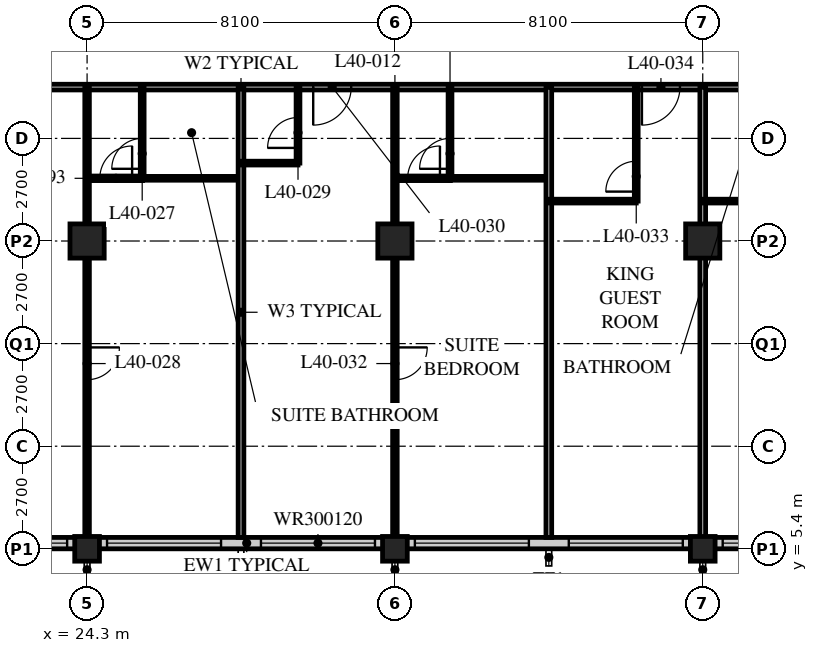
"""IFC4 building model, lengths in metres.
Left out: names, types, materials, properties, quantities, classifications, styles, units other than length and angle.
Written with IfcOpenShell. Run it as: python <this file> out.ifc"""

import sys

from ifc_helpers import new_model, si_unit, direction, frame, frame_2d, origin, origin_2d, place, context, subcontext, project, spatial, rectangle, hollow_rectangle, extrude, element, fill, save


model = new_model("IFC4")
c1 = context("Model", 3, precision=1e-05, world=origin(), true_north=direction((0.0, 1.0)))
c2 = subcontext(c1, "Body", "Model", "MODEL_VIEW")
j1 = project(units=[si_unit("LENGTHUNIT", "METRE"), si_unit("PLANEANGLEUNIT", "RADIAN")], contexts=[c1])
p1 = place(None, origin())
s1 = spatial("IfcSite", under=j1, at=p1, CompositionType="ELEMENT")
p2 = place(p1, origin())
s2 = spatial("IfcBuilding", under=s1, at=p2, CompositionType="ELEMENT")
p3 = place(p2, frame((0.0, 0.0, 154.4)))
s3 = spatial("IfcBuildingStorey", under=s2, at=p3, CompositionType="ELEMENT", Elevation=154.4)
p4 = place(p3, frame((24.3, 5.4, 0.0), z_axis=(0.0, 0.0, 1.0), x_axis=(1.0, 0.0, 0.0)))
e1 = element("IfcColumn", 1, at=p4, inside=s3, PredefinedType="COLUMN", context=c2, shape_type="SweptSolid", body=[
    extrude(hollow_rectangle(XDim=0.65, YDim=0.65, WallThickness=0.055, at=origin_2d()), origin(), (0.0, 0.0, 1.0), 3.4),
])
p5 = place(p3, frame((24.3, 13.5, 0.0), z_axis=(0.0, 0.0, 1.0), x_axis=(1.0, 0.0, 0.0)))
e2 = element("IfcColumn", 2, at=p5, inside=s3, PredefinedType="COLUMN", context=c2, shape_type="SweptSolid", body=[
    extrude(hollow_rectangle(XDim=0.9, YDim=0.9, WallThickness=0.1, at=origin_2d()), origin(), (0.0, 0.0, 1.0), 3.4),
])
p6 = place(p3, frame((32.4, 5.4, 0.0), z_axis=(0.0, 0.0, 1.0), x_axis=(1.0, 0.0, 0.0)))
e3 = element("IfcColumn", 3, at=p6, inside=s3, PredefinedType="COLUMN", context=c2, shape_type="SweptSolid", body=[
    extrude(hollow_rectangle(XDim=0.65, YDim=0.65, WallThickness=0.055, at=origin_2d()), origin(), (0.0, 0.0, 1.0), 3.4),
])
p7 = place(p3, frame((32.4, 13.5, 0.0), z_axis=(0.0, 0.0, 1.0), x_axis=(1.0, 0.0, 0.0)))
e4 = element("IfcColumn", 4, at=p7, inside=s3, PredefinedType="COLUMN", context=c2, shape_type="SweptSolid", body=[
    extrude(hollow_rectangle(XDim=0.9, YDim=0.9, WallThickness=0.1, at=origin_2d()), origin(), (0.0, 0.0, 1.0), 3.4),
])
p8 = place(p3, frame((40.5, 5.4, 0.0), z_axis=(0.0, 0.0, 1.0), x_axis=(1.0, 0.0, 0.0)))
e5 = element("IfcColumn", 5, at=p8, inside=s3, PredefinedType="COLUMN", context=c2, shape_type="SweptSolid", body=[
    extrude(hollow_rectangle(XDim=0.65, YDim=0.65, WallThickness=0.055, at=origin_2d()), origin(), (0.0, 0.0, 1.0), 3.4),
])
p9 = place(p3, frame((40.5, 13.5, 0.0), z_axis=(0.0, 0.0, 1.0), x_axis=(1.0, 0.0, 0.0)))
e6 = element("IfcColumn", 6, at=p9, inside=s3, PredefinedType="COLUMN", context=c2, shape_type="SweptSolid", body=[
    extrude(hollow_rectangle(XDim=0.9, YDim=0.9, WallThickness=0.1, at=origin_2d()), origin(), (0.0, 0.0, 1.0), 3.4),
])
p10 = place(p3, frame((8.4, 5.55, 0.0), z_axis=(0.0, 0.0, 1.0), x_axis=(1.0, 0.0, 0.0)))
e7 = element("IfcWall", 7, at=p10, inside=s3, PredefinedType="SOLIDWALL", context=c2, shape_type="SweptSolid", body=[
    extrude(rectangle(XDim=40.2, YDim=0.3, at=frame_2d((20.1, 0.0))), origin(), (0.0, 0.0, 1.0), 2.15),
])
p11 = place(p10, frame((0.225, 0.0, 0.9)))
e8 = element("IfcOpeningElement", 8, at=p11, cuts=e7, PredefinedType="OPENING", context=c2, shape_type="SweptSolid", body=[
    extrude(rectangle(XDim=3.0, YDim=1.2, at=frame_2d((1.5, 0.6))), frame((0.0, 0.16, 0.0), z_axis=(0.0, -1.0, 0.0), x_axis=(1.0, 0.0, 0.0)), (0.0, 0.0, 1.0), 0.32),
])
p12 = place(p10, frame((4.275, 0.0, 0.9)))
e9 = element("IfcOpeningElement", 9, at=p12, cuts=e7, PredefinedType="OPENING", context=c2, shape_type="SweptSolid", body=[
    extrude(rectangle(XDim=3.0, YDim=1.2, at=frame_2d((1.5, 0.6))), frame((0.0, 0.16, 0.0), z_axis=(0.0, -1.0, 0.0), x_axis=(1.0, 0.0, 0.0)), (0.0, 0.0, 1.0), 0.32),
])
p13 = place(p10, frame((8.325, 0.0, 0.9)))
e10 = element("IfcOpeningElement", 10, at=p13, cuts=e7, PredefinedType="OPENING", context=c2, shape_type="SweptSolid", body=[
    extrude(rectangle(XDim=3.0, YDim=1.2, at=frame_2d((1.5, 0.6))), frame((0.0, 0.16, 0.0), z_axis=(0.0, -1.0, 0.0), x_axis=(1.0, 0.0, 0.0)), (0.0, 0.0, 1.0), 0.32),
])
p14 = place(p10, frame((12.375, 0.0, 0.9)))
e11 = element("IfcOpeningElement", 11, at=p14, cuts=e7, PredefinedType="OPENING", context=c2, shape_type="SweptSolid", body=[
    extrude(rectangle(XDim=3.0, YDim=1.2, at=frame_2d((1.5, 0.6))), frame((0.0, 0.16, 0.0), z_axis=(0.0, -1.0, 0.0), x_axis=(1.0, 0.0, 0.0)), (0.0, 0.0, 1.0), 0.32),
])
p15 = place(p10, frame((16.425, 0.0, 0.9)))
e12 = element("IfcOpeningElement", 12, at=p15, cuts=e7, PredefinedType="OPENING", context=c2, shape_type="SweptSolid", body=[
    extrude(rectangle(XDim=3.0, YDim=1.2, at=frame_2d((1.5, 0.6))), frame((0.0, 0.16, 0.0), z_axis=(0.0, -1.0, 0.0), x_axis=(1.0, 0.0, 0.0)), (0.0, 0.0, 1.0), 0.32),
])
p16 = place(p10, frame((20.475, 0.0, 0.9)))
e13 = element("IfcOpeningElement", 13, at=p16, cuts=e7, PredefinedType="OPENING", context=c2, shape_type="SweptSolid", body=[
    extrude(rectangle(XDim=3.0, YDim=1.2, at=frame_2d((1.5, 0.6))), frame((0.0, 0.16, 0.0), z_axis=(0.0, -1.0, 0.0), x_axis=(1.0, 0.0, 0.0)), (0.0, 0.0, 1.0), 0.32),
])
p17 = place(p10, frame((24.525, 0.0, 0.9)))
e14 = element("IfcOpeningElement", 14, at=p17, cuts=e7, PredefinedType="OPENING", context=c2, shape_type="SweptSolid", body=[
    extrude(rectangle(XDim=3.0, YDim=1.2, at=frame_2d((1.5, 0.6))), frame((0.0, 0.16, 0.0), z_axis=(0.0, -1.0, 0.0), x_axis=(1.0, 0.0, 0.0)), (0.0, 0.0, 1.0), 0.32),
])
p18 = place(p10, frame((28.575, 0.0, 0.9)))
e15 = element("IfcOpeningElement", 15, at=p18, cuts=e7, PredefinedType="OPENING", context=c2, shape_type="SweptSolid", body=[
    extrude(rectangle(XDim=3.0, YDim=1.2, at=frame_2d((1.5, 0.6))), frame((0.0, 0.16, 0.0), z_axis=(0.0, -1.0, 0.0), x_axis=(1.0, 0.0, 0.0)), (0.0, 0.0, 1.0), 0.32),
])
p19 = place(p10, frame((32.625, 0.0, 0.9)))
e16 = element("IfcOpeningElement", 16, at=p19, cuts=e7, PredefinedType="OPENING", context=c2, shape_type="SweptSolid", body=[
    extrude(rectangle(XDim=3.0, YDim=1.2, at=frame_2d((1.5, 0.6))), frame((0.0, 0.16, 0.0), z_axis=(0.0, -1.0, 0.0), x_axis=(1.0, 0.0, 0.0)), (0.0, 0.0, 1.0), 0.32),
])
p20 = place(p10, frame((36.675, 0.0, 0.9)))
e17 = element("IfcOpeningElement", 17, at=p20, cuts=e7, PredefinedType="OPENING", context=c2, shape_type="SweptSolid", body=[
    extrude(rectangle(XDim=3.0, YDim=1.2, at=frame_2d((1.5, 0.6))), frame((0.0, 0.16, 0.0), z_axis=(0.0, -1.0, 0.0), x_axis=(1.0, 0.0, 0.0)), (0.0, 0.0, 1.0), 0.32),
])
p21 = place(p3, frame((8.1, 17.55, 0.0), z_axis=(0.0, 0.0, 1.0), x_axis=(1.0, 0.0, 0.0)))
e18 = element("IfcWall", 18, at=p21, inside=s3, PredefinedType="PARTITIONING", context=c2, shape_type="SweptSolid", body=[
    extrude(rectangle(XDim=40.5, YDim=0.15, at=frame_2d((20.25, 0.0))), origin(), (0.0, 0.0, 1.0), 3.15),
])
p22 = place(p21, frame((10.0, 0.0, 0.0)))
e19 = element("IfcOpeningElement", 19, at=p22, cuts=e18, PredefinedType="OPENING", context=c2, shape_type="SweptSolid", body=[
    extrude(rectangle(XDim=1.0, YDim=2.1, at=frame_2d((0.5, 1.05))), frame((0.0, 0.085, 0.0), z_axis=(0.0, -1.0, 0.0), x_axis=(1.0, 0.0, 0.0)), (0.0, 0.0, 1.0), 0.17),
])
p23 = place(p21, frame((22.15, 0.0, 0.0)))
e20 = element("IfcOpeningElement", 20, at=p23, cuts=e18, PredefinedType="OPENING", context=c2, shape_type="SweptSolid", body=[
    extrude(rectangle(XDim=1.0, YDim=2.1, at=frame_2d((0.5, 1.05))), frame((0.0, 0.085, 0.0), z_axis=(0.0, -1.0, 0.0), x_axis=(1.0, 0.0, 0.0)), (0.0, 0.0, 1.0), 0.17),
])
p24 = place(p21, frame((30.8, 0.0, 0.0)))
e21 = element("IfcOpeningElement", 21, at=p24, cuts=e18, PredefinedType="OPENING", context=c2, shape_type="SweptSolid", body=[
    extrude(rectangle(XDim=1.0, YDim=2.1, at=frame_2d((0.5, 1.05))), frame((0.0, 0.085, 0.0), z_axis=(0.0, -1.0, 0.0), x_axis=(1.0, 0.0, 0.0)), (0.0, 0.0, 1.0), 0.17),
])
p25 = place(p21, frame((34.85, 0.0, 0.0)))
e22 = element("IfcOpeningElement", 22, at=p25, cuts=e18, PredefinedType="OPENING", context=c2, shape_type="SweptSolid", body=[
    extrude(rectangle(XDim=1.0, YDim=2.1, at=frame_2d((0.5, 1.05))), frame((0.0, 0.085, 0.0), z_axis=(0.0, -1.0, 0.0), x_axis=(1.0, 0.0, 0.0)), (0.0, 0.0, 1.0), 0.17),
])
p26 = place(p21, frame((1.525, 0.0, 0.0)))
e23 = element("IfcOpeningElement", 23, at=p26, cuts=e18, PredefinedType="OPENING", context=c2, shape_type="SweptSolid", body=[
    extrude(rectangle(XDim=1.0, YDim=2.1, at=frame_2d((0.5, 1.05))), frame((0.0, 0.085, 0.0), z_axis=(0.0, -1.0, 0.0), x_axis=(1.0, 0.0, 0.0)), (0.0, 0.0, 1.0), 0.17),
])
p27 = place(p21, frame((37.975, 0.0, 0.0)))
e24 = element("IfcOpeningElement", 24, at=p27, cuts=e18, PredefinedType="OPENING", context=c2, shape_type="SweptSolid", body=[
    extrude(rectangle(XDim=1.0, YDim=2.1, at=frame_2d((0.5, 1.05))), frame((0.0, 0.085, 0.0), z_axis=(0.0, -1.0, 0.0), x_axis=(1.0, 0.0, 0.0)), (0.0, 0.0, 1.0), 0.17),
])
p28 = place(p3, frame((25.75, 15.15, 0.0), z_axis=(0.0, 0.0, 1.0), x_axis=(1.0, 0.0, 0.0)))
e25 = element("IfcWall", 25, at=p28, inside=s3, PredefinedType="PARTITIONING", context=c2, shape_type="SweptSolid", body=[
    extrude(rectangle(XDim=2.6, YDim=0.1, at=frame_2d((1.3, 0.0))), origin(), (0.0, 0.0, 1.0), 3.15),
])
p29 = place(p3, frame((25.75, 17.55, 0.0), z_axis=(0.0, 0.0, 1.0), x_axis=(0.0, -1.0, 0.0)))
e26 = element("IfcWall", 26, at=p29, inside=s3, PredefinedType="PARTITIONING", context=c2, shape_type="SweptSolid", body=[
    extrude(rectangle(XDim=2.4, YDim=0.1, at=frame_2d((1.2, 0.0))), origin(), (0.0, 0.0, 1.0), 3.15),
])
p30 = place(p29, frame((1.35, 0.0, 0.0)))
e27 = element("IfcOpeningElement", 27, at=p30, cuts=e26, PredefinedType="OPENING", context=c2, shape_type="SweptSolid", body=[
    extrude(rectangle(XDim=0.8, YDim=2.1, at=frame_2d((0.4, 1.05))), frame((0.0, 0.06, 0.0), z_axis=(0.0, -1.0, 0.0), x_axis=(1.0, 0.0, 0.0)), (0.0, 0.0, 1.0), 0.12),
])
p31 = place(p3, frame((24.3, 17.55, 0.0), z_axis=(0.0, 0.0, 1.0), x_axis=(0.0, -1.0, 0.0)))
e28 = element("IfcWall", 28, at=p31, inside=s3, PredefinedType="PARTITIONING", context=c2, shape_type="SweptSolid", body=[
    extrude(rectangle(XDim=11.85, YDim=0.12, at=frame_2d((5.925, 0.0))), origin(), (0.0, 0.0, 1.0), 2.15),
])
p32 = place(p31, frame((6.85, 0.0, 0.0)))
e29 = element("IfcOpeningElement", 29, at=p32, cuts=e28, PredefinedType="OPENING", context=c2, shape_type="SweptSolid", body=[
    extrude(rectangle(XDim=0.85, YDim=2.1, at=frame_2d((0.425, 1.05))), frame((0.0, 0.07, 0.0), z_axis=(0.0, -1.0, 0.0), x_axis=(1.0, 0.0, 0.0)), (0.0, 0.0, 1.0), 0.14),
])
p33 = place(p3, frame((28.35, 17.55, 0.0), z_axis=(0.0, 0.0, 1.0), x_axis=(0.0, -1.0, 0.0)))
e30 = element("IfcWall", 30, at=p33, inside=s3, PredefinedType="PARTITIONING", context=c2, shape_type="SweptSolid", body=[
    extrude(rectangle(XDim=11.85, YDim=0.15, at=frame_2d((5.925, 0.0))), origin(), (0.0, 0.0, 1.0), 3.15),
])
p34 = place(p3, frame((28.35, 15.55, 0.0), z_axis=(0.0, 0.0, 1.0), x_axis=(1.0, 0.0, 0.0)))
e31 = element("IfcWall", 31, at=p34, inside=s3, PredefinedType="PARTITIONING", context=c2, shape_type="SweptSolid", body=[
    extrude(rectangle(XDim=1.5, YDim=0.1, at=frame_2d((0.75, 0.0))), origin(), (0.0, 0.0, 1.0), 3.15),
])
p35 = place(p3, frame((29.85, 17.55, 0.0), z_axis=(0.0, 0.0, 1.0), x_axis=(0.0, -1.0, 0.0)))
e32 = element("IfcWall", 32, at=p35, inside=s3, PredefinedType="PARTITIONING", context=c2, shape_type="SweptSolid", body=[
    extrude(rectangle(XDim=2.0, YDim=0.1, at=frame_2d((1.0, 0.0))), origin(), (0.0, 0.0, 1.0), 3.15),
])
p36 = place(p35, frame((0.8, 0.0, 0.0)))
e33 = element("IfcOpeningElement", 33, at=p36, cuts=e32, PredefinedType="OPENING", context=c2, shape_type="SweptSolid", body=[
    extrude(rectangle(XDim=0.8, YDim=2.1, at=frame_2d((0.4, 1.05))), frame((0.0, 0.06, 0.0), z_axis=(0.0, -1.0, 0.0), x_axis=(1.0, 0.0, 0.0)), (0.0, 0.0, 1.0), 0.12),
])
p37 = place(p3, frame((33.85, 15.15, 0.0), z_axis=(0.0, 0.0, 1.0), x_axis=(1.0, 0.0, 0.0)))
e34 = element("IfcWall", 34, at=p37, inside=s3, PredefinedType="PARTITIONING", context=c2, shape_type="SweptSolid", body=[
    extrude(rectangle(XDim=2.6, YDim=0.1, at=frame_2d((1.3, 0.0))), origin(), (0.0, 0.0, 1.0), 3.15),
])
p38 = place(p3, frame((33.85, 17.55, 0.0), z_axis=(0.0, 0.0, 1.0), x_axis=(0.0, -1.0, 0.0)))
e35 = element("IfcWall", 35, at=p38, inside=s3, PredefinedType="PARTITIONING", context=c2, shape_type="SweptSolid", body=[
    extrude(rectangle(XDim=2.4, YDim=0.1, at=frame_2d((1.2, 0.0))), origin(), (0.0, 0.0, 1.0), 3.15),
])
p39 = place(p38, frame((1.35, 0.0, 0.0)))
e36 = element("IfcOpeningElement", 36, at=p39, cuts=e35, PredefinedType="OPENING", context=c2, shape_type="SweptSolid", body=[
    extrude(rectangle(XDim=0.8, YDim=2.1, at=frame_2d((0.4, 1.05))), frame((0.0, 0.06, 0.0), z_axis=(0.0, -1.0, 0.0), x_axis=(1.0, 0.0, 0.0)), (0.0, 0.0, 1.0), 0.12),
])
p40 = place(p3, frame((32.4, 17.55, 0.0), z_axis=(0.0, 0.0, 1.0), x_axis=(0.0, -1.0, 0.0)))
e37 = element("IfcWall", 37, at=p40, inside=s3, PredefinedType="PARTITIONING", context=c2, shape_type="SweptSolid", body=[
    extrude(rectangle(XDim=11.85, YDim=0.12, at=frame_2d((5.925, 0.0))), origin(), (0.0, 0.0, 1.0), 2.15),
])
p41 = place(p40, frame((6.85, 0.0, 0.0)))
e38 = element("IfcOpeningElement", 38, at=p41, cuts=e37, PredefinedType="OPENING", context=c2, shape_type="SweptSolid", body=[
    extrude(rectangle(XDim=0.85, YDim=2.1, at=frame_2d((0.425, 1.05))), frame((0.0, 0.07, 0.0), z_axis=(0.0, -1.0, 0.0), x_axis=(1.0, 0.0, 0.0)), (0.0, 0.0, 1.0), 0.14),
])
p42 = place(p3, frame((36.45, 17.55, 0.0), z_axis=(0.0, 0.0, 1.0), x_axis=(0.0, -1.0, 0.0)))
e39 = element("IfcWall", 39, at=p42, inside=s3, PredefinedType="PARTITIONING", context=c2, shape_type="SweptSolid", body=[
    extrude(rectangle(XDim=11.85, YDim=0.15, at=frame_2d((5.925, 0.0))), origin(), (0.0, 0.0, 1.0), 3.15),
])
p43 = place(p3, frame((36.45, 14.55, 0.0), z_axis=(0.0, 0.0, 1.0), x_axis=(1.0, 0.0, 0.0)))
e40 = element("IfcWall", 40, at=p43, inside=s3, PredefinedType="PARTITIONING", context=c2, shape_type="SweptSolid", body=[
    extrude(rectangle(XDim=2.3, YDim=0.1, at=frame_2d((1.15, 0.0))), origin(), (0.0, 0.0, 1.0), 3.15),
])
p44 = place(p3, frame((38.75, 17.55, 0.0), z_axis=(0.0, 0.0, 1.0), x_axis=(0.0, -1.0, 0.0)))
e41 = element("IfcWall", 41, at=p44, inside=s3, PredefinedType="PARTITIONING", context=c2, shape_type="SweptSolid", body=[
    extrude(rectangle(XDim=3.0, YDim=0.1, at=frame_2d((1.5, 0.0))), origin(), (0.0, 0.0, 1.0), 3.15),
])
p45 = place(p44, frame((1.95, 0.0, 0.0)))
e42 = element("IfcOpeningElement", 42, at=p45, cuts=e41, PredefinedType="OPENING", context=c2, shape_type="SweptSolid", body=[
    extrude(rectangle(XDim=0.8, YDim=2.1, at=frame_2d((0.4, 1.05))), frame((0.0, 0.06, 0.0), z_axis=(0.0, -1.0, 0.0), x_axis=(1.0, 0.0, 0.0)), (0.0, 0.0, 1.0), 0.12),
])
p46 = place(p3, frame((40.5, 17.55, 0.0), z_axis=(0.0, 0.0, 1.0), x_axis=(0.0, -1.0, 0.0)))
e43 = element("IfcWall", 43, at=p46, inside=s3, PredefinedType="PARTITIONING", context=c2, shape_type="SweptSolid", body=[
    extrude(rectangle(XDim=11.85, YDim=0.15, at=frame_2d((5.925, 0.0))), origin(), (0.0, 0.0, 1.0), 2.15),
])
p47 = place(p3, frame((40.5, 14.55, 0.0), z_axis=(0.0, 0.0, 1.0), x_axis=(1.0, 0.0, 0.0)))
e44 = element("IfcWall", 44, at=p47, inside=s3, PredefinedType="PARTITIONING", context=c2, shape_type="SweptSolid", body=[
    extrude(rectangle(XDim=2.3, YDim=0.1, at=frame_2d((1.15, 0.0))), origin(), (0.0, 0.0, 1.0), 3.15),
])
p48 = place(p3, frame((25.76, 15.15, 0.0), z_axis=(0.0, 0.0, 1.0), x_axis=(-1.0, 0.0, 0.0)))
e45 = element("IfcWall", 45, at=p48, inside=s3, PredefinedType="PARTITIONING", context=c2, shape_type="SweptSolid", body=[
    extrude(rectangle(XDim=1.46, YDim=0.12, at=frame_2d((0.73, 0.0))), origin(), (0.0, 0.0, 1.0), 3.15),
])
p49 = place(p48, frame((0.275, 0.0, 0.0)))
e46 = element("IfcOpeningElement", 46, at=p49, cuts=e45, PredefinedType="OPENING", context=c2, shape_type="SweptSolid", body=[
    extrude(rectangle(XDim=0.85, YDim=2.1, at=frame_2d((0.425, 1.05))), frame((0.0, 0.07, 0.0), z_axis=(0.0, -1.0, 0.0), x_axis=(1.0, 0.0, 0.0)), (0.0, 0.0, 1.0), 0.14),
])
p50 = place(p3, frame((33.86, 15.15, 0.0), z_axis=(0.0, 0.0, 1.0), x_axis=(-1.0, 0.0, 0.0)))
e47 = element("IfcWall", 47, at=p50, inside=s3, PredefinedType="PARTITIONING", context=c2, shape_type="SweptSolid", body=[
    extrude(rectangle(XDim=1.46, YDim=0.12, at=frame_2d((0.73, 0.0))), origin(), (0.0, 0.0, 1.0), 3.15),
])
p51 = place(p50, frame((0.275, 0.0, 0.0)))
e48 = element("IfcOpeningElement", 48, at=p51, cuts=e47, PredefinedType="OPENING", context=c2, shape_type="SweptSolid", body=[
    extrude(rectangle(XDim=0.85, YDim=2.1, at=frame_2d((0.425, 1.05))), frame((0.0, 0.07, 0.0), z_axis=(0.0, -1.0, 0.0), x_axis=(1.0, 0.0, 0.0)), (0.0, 0.0, 1.0), 0.14),
])
p52 = place(p14, origin())
e49 = element("IfcWindow", 49, at=p52, inside=s3, PartitioningType="SINGLE_PANEL", PredefinedType="WINDOW", context=c2, shape_type="SweptSolid", body=[
    extrude(rectangle(XDim=3.0, YDim=1.2, at=frame_2d((1.5, 0.6))), frame((0.0, 0.03, 0.0), z_axis=(0.0, -1.0, 0.0), x_axis=(1.0, 0.0, 0.0)), (0.0, 0.0, 1.0), 0.06),
])
fill(e11, e49)
p53 = place(p15, origin())
e50 = element("IfcWindow", 50, at=p53, inside=s3, PartitioningType="SINGLE_PANEL", PredefinedType="WINDOW", context=c2, shape_type="SweptSolid", body=[
    extrude(rectangle(XDim=3.0, YDim=1.2, at=frame_2d((1.5, 0.6))), frame((0.0, 0.03, 0.0), z_axis=(0.0, -1.0, 0.0), x_axis=(1.0, 0.0, 0.0)), (0.0, 0.0, 1.0), 0.06),
])
fill(e12, e50)
p54 = place(p16, origin())
e51 = element("IfcWindow", 51, at=p54, inside=s3, PartitioningType="SINGLE_PANEL", PredefinedType="WINDOW", context=c2, shape_type="SweptSolid", body=[
    extrude(rectangle(XDim=3.0, YDim=1.2, at=frame_2d((1.5, 0.6))), frame((0.0, 0.03, 0.0), z_axis=(0.0, -1.0, 0.0), x_axis=(1.0, 0.0, 0.0)), (0.0, 0.0, 1.0), 0.06),
])
fill(e13, e51)
p55 = place(p17, origin())
e52 = element("IfcWindow", 52, at=p55, inside=s3, PartitioningType="SINGLE_PANEL", PredefinedType="WINDOW", context=c2, shape_type="SweptSolid", body=[
    extrude(rectangle(XDim=3.0, YDim=1.2, at=frame_2d((1.5, 0.6))), frame((0.0, 0.03, 0.0), z_axis=(0.0, -1.0, 0.0), x_axis=(1.0, 0.0, 0.0)), (0.0, 0.0, 1.0), 0.06),
])
fill(e14, e52)
p56 = place(p18, origin())
e53 = element("IfcWindow", 53, at=p56, inside=s3, PartitioningType="SINGLE_PANEL", PredefinedType="WINDOW", context=c2, shape_type="SweptSolid", body=[
    extrude(rectangle(XDim=3.0, YDim=1.2, at=frame_2d((1.5, 0.6))), frame((0.0, 0.03, 0.0), z_axis=(0.0, -1.0, 0.0), x_axis=(1.0, 0.0, 0.0)), (0.0, 0.0, 1.0), 0.06),
])
fill(e15, e53)
p57 = place(p19, origin())
e54 = element("IfcWindow", 54, at=p57, inside=s3, PartitioningType="SINGLE_PANEL", PredefinedType="WINDOW", context=c2, shape_type="SweptSolid", body=[
    extrude(rectangle(XDim=3.0, YDim=1.2, at=frame_2d((1.5, 0.6))), frame((0.0, 0.03, 0.0), z_axis=(0.0, -1.0, 0.0), x_axis=(1.0, 0.0, 0.0)), (0.0, 0.0, 1.0), 0.06),
])
fill(e16, e54)
p58 = place(p30, origin())
e55 = element("IfcDoor", 55, at=p58, inside=s3, OperationType="SINGLE_SWING_LEFT", PredefinedType="DOOR", context=c2, shape_type="SweptSolid", body=[
    extrude(rectangle(XDim=0.8, YDim=2.1, at=frame_2d((0.4, 1.05))), frame((0.0, 0.025, 0.0), z_axis=(0.0, -1.0, 0.0), x_axis=(1.0, 0.0, 0.0)), (0.0, 0.0, 1.0), 0.05),
])
fill(e27, e55)
p59 = place(p32, origin())
e56 = element("IfcDoor", 56, at=p59, inside=s3, OperationType="SINGLE_SWING_LEFT", PredefinedType="DOOR", context=c2, shape_type="SweptSolid", body=[
    extrude(rectangle(XDim=0.85, YDim=2.1, at=frame_2d((0.425, 1.05))), frame((0.0, 0.025, 0.0), z_axis=(0.0, -1.0, 0.0), x_axis=(1.0, 0.0, 0.0)), (0.0, 0.0, 1.0), 0.05),
])
fill(e29, e56)
p60 = place(p36, origin())
e57 = element("IfcDoor", 57, at=p60, inside=s3, OperationType="SINGLE_SWING_LEFT", PredefinedType="DOOR", context=c2, shape_type="SweptSolid", body=[
    extrude(rectangle(XDim=0.8, YDim=2.1, at=frame_2d((0.4, 1.05))), frame((0.0, 0.025, 0.0), z_axis=(0.0, -1.0, 0.0), x_axis=(1.0, 0.0, 0.0)), (0.0, 0.0, 1.0), 0.05),
])
fill(e33, e57)
p61 = place(p23, origin())
e58 = element("IfcDoor", 58, at=p61, inside=s3, OperationType="SINGLE_SWING_RIGHT", PredefinedType="DOOR", context=c2, shape_type="SweptSolid", body=[
    extrude(rectangle(XDim=1.0, YDim=2.1, at=frame_2d((0.5, 1.05))), frame((0.0, 0.025, 0.0), z_axis=(0.0, -1.0, 0.0), x_axis=(1.0, 0.0, 0.0)), (0.0, 0.0, 1.0), 0.05),
])
fill(e20, e58)
p62 = place(p39, origin())
e59 = element("IfcDoor", 59, at=p62, inside=s3, OperationType="SINGLE_SWING_LEFT", PredefinedType="DOOR", context=c2, shape_type="SweptSolid", body=[
    extrude(rectangle(XDim=0.8, YDim=2.1, at=frame_2d((0.4, 1.05))), frame((0.0, 0.025, 0.0), z_axis=(0.0, -1.0, 0.0), x_axis=(1.0, 0.0, 0.0)), (0.0, 0.0, 1.0), 0.05),
])
fill(e36, e59)
p63 = place(p41, origin())
e60 = element("IfcDoor", 60, at=p63, inside=s3, OperationType="SINGLE_SWING_LEFT", PredefinedType="DOOR", context=c2, shape_type="SweptSolid", body=[
    extrude(rectangle(XDim=0.85, YDim=2.1, at=frame_2d((0.425, 1.05))), frame((0.0, 0.025, 0.0), z_axis=(0.0, -1.0, 0.0), x_axis=(1.0, 0.0, 0.0)), (0.0, 0.0, 1.0), 0.05),
])
fill(e38, e60)
p64 = place(p45, origin())
e61 = element("IfcDoor", 61, at=p64, inside=s3, OperationType="SINGLE_SWING_LEFT", PredefinedType="DOOR", context=c2, shape_type="SweptSolid", body=[
    extrude(rectangle(XDim=0.8, YDim=2.1, at=frame_2d((0.4, 1.05))), frame((0.0, 0.025, 0.0), z_axis=(0.0, -1.0, 0.0), x_axis=(1.0, 0.0, 0.0)), (0.0, 0.0, 1.0), 0.05),
])
fill(e42, e61)
p65 = place(p24, origin())
e62 = element("IfcDoor", 62, at=p65, inside=s3, OperationType="SINGLE_SWING_RIGHT", PredefinedType="DOOR", context=c2, shape_type="SweptSolid", body=[
    extrude(rectangle(XDim=1.0, YDim=2.1, at=frame_2d((0.5, 1.05))), frame((0.0, 0.025, 0.0), z_axis=(0.0, -1.0, 0.0), x_axis=(1.0, 0.0, 0.0)), (0.0, 0.0, 1.0), 0.05),
])
fill(e21, e62)
p66 = place(p49, origin())
e63 = element("IfcDoor", 63, at=p66, inside=s3, OperationType="SINGLE_SWING_RIGHT", PredefinedType="DOOR", context=c2, shape_type="SweptSolid", body=[
    extrude(rectangle(XDim=0.85, YDim=2.1, at=frame_2d((0.425, 1.05))), frame((0.0, 0.025, 0.0), z_axis=(0.0, -1.0, 0.0), x_axis=(1.0, 0.0, 0.0)), (0.0, 0.0, 1.0), 0.05),
])
fill(e46, e63)
p67 = place(p51, origin())
e64 = element("IfcDoor", 64, at=p67, inside=s3, OperationType="SINGLE_SWING_RIGHT", PredefinedType="DOOR", context=c2, shape_type="SweptSolid", body=[
    extrude(rectangle(XDim=0.85, YDim=2.1, at=frame_2d((0.425, 1.05))), frame((0.0, 0.025, 0.0), z_axis=(0.0, -1.0, 0.0), x_axis=(1.0, 0.0, 0.0)), (0.0, 0.0, 1.0), 0.05),
])
fill(e48, e64)
save(model, sys.argv[1])
